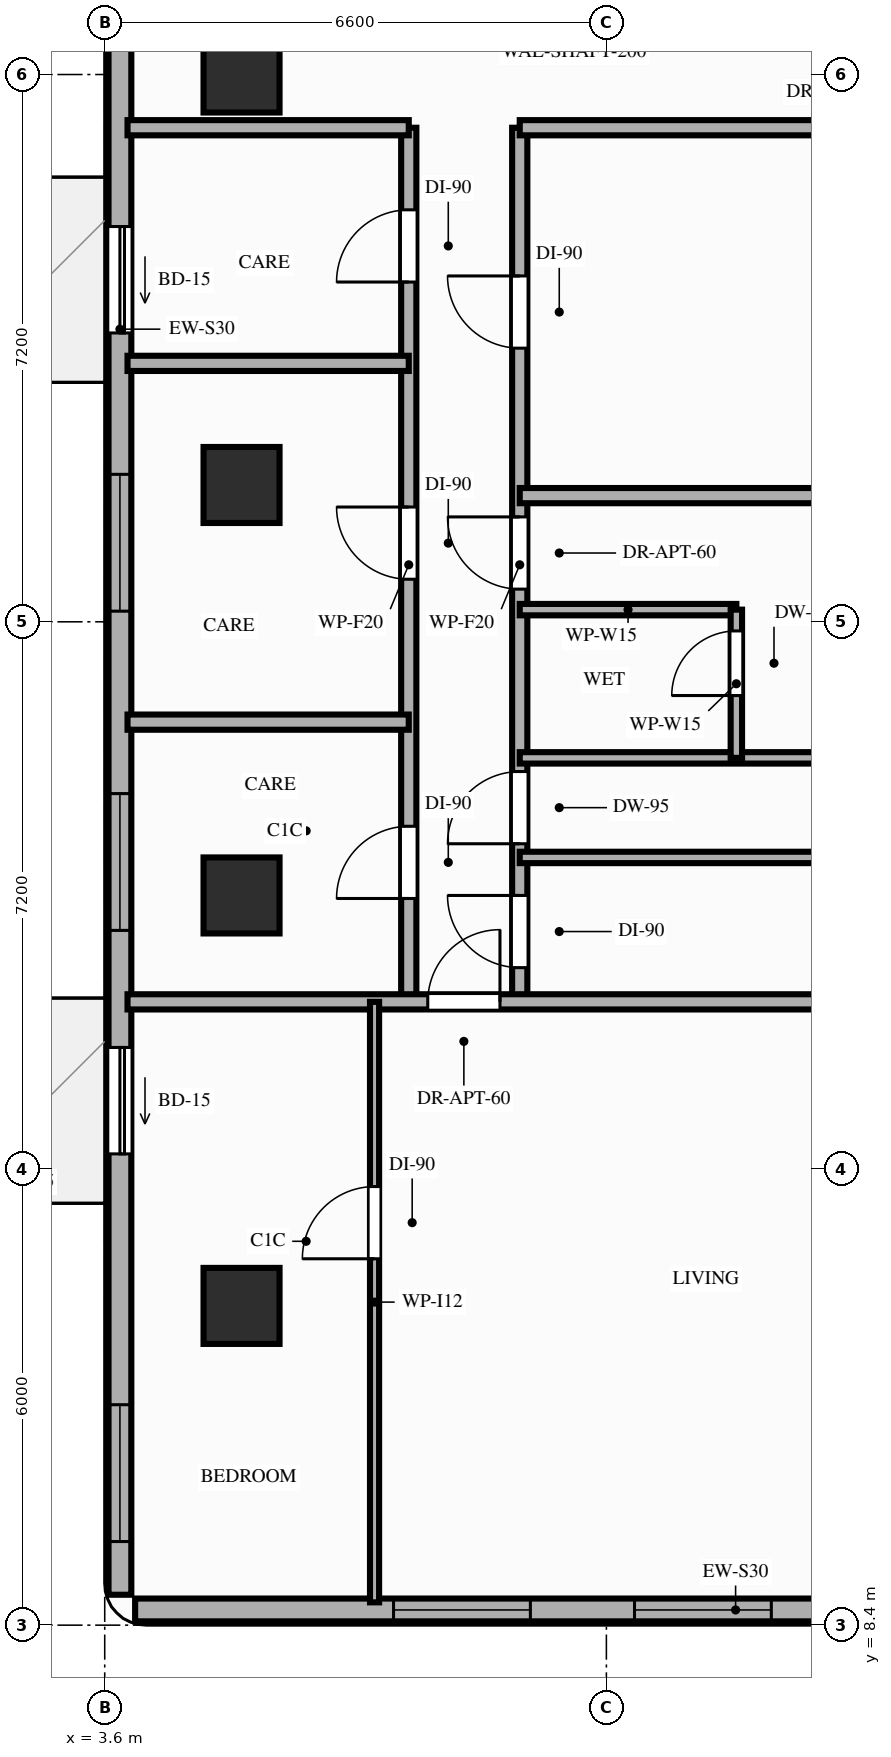
"""IFC4 building model, lengths in metres.
Left out: names, types, materials, properties, quantities, classifications, styles, units other than length and angle.
Written with IfcOpenShell. Run it as: python <this file> out.ifc"""

import sys

from ifc_helpers import new_model, si_unit, direction, frame, frame_2d, origin, origin_2d, place, context, subcontext, project, spatial, rectangle, extrude, element, fill, save


model = new_model("IFC4")
c1 = context("Model", 3, precision=1e-05, world=origin(), true_north=direction((0.0, 1.0)))
c2 = subcontext(c1, "Body", "Model", "MODEL_VIEW")
j1 = project(units=[si_unit("LENGTHUNIT", "METRE"), si_unit("PLANEANGLEUNIT", "RADIAN")], contexts=[c1])
p1 = place(None, origin())
s1 = spatial("IfcSite", under=j1, at=p1, CompositionType="ELEMENT")
p2 = place(p1, origin())
s2 = spatial("IfcBuilding", under=s1, at=p2, CompositionType="ELEMENT")
p3 = place(p2, frame((0.0, 0.0, 152.2)))
s3 = spatial("IfcBuildingStorey", under=s2, at=p3, CompositionType="ELEMENT", Elevation=152.2)
for number, where, z_axis, x_axis in (
    (1, (5.4, 12.6, 0.0), (0.0, 0.0, 1.0), (1.0, 0.0, 0.0)),
    (2, (5.4, 18.0, 0.0), (0.0, 0.0, 1.0), (1.0, 0.0, 0.0)),
    (3, (5.4, 23.4, 0.0), (0.0, 0.0, 1.0), (1.0, 0.0, 0.0)),
    (4, (5.4, 28.8, 0.0), (0.0, 0.0, 1.0), (1.0, 0.0, 0.0)),
):
    element("IfcColumn", number, at=place(p3, frame(where, z_axis=z_axis, x_axis=x_axis)), inside=s3, PredefinedType="COLUMN", context=c2, shape_type="SweptSolid", body=[
        extrude(rectangle(XDim=1.0, YDim=1.0, at=origin_2d()), origin(), (0.0, 0.0, 1.0), 3.8),
    ])
p4 = place(p3, frame((4.0, 8.6, 0.0), z_axis=(0.0, 0.0, 1.0), x_axis=(1.0, 0.0, 0.0)))
e5 = element("IfcWall", 5, at=p4, inside=s3, PredefinedType="STANDARD", context=c2, shape_type="SweptSolid", body=[
    extrude(rectangle(XDim=15.8, YDim=0.3, at=frame_2d((7.9, 0.0))), origin(), (0.0, 0.0, 1.0), 3.56),
])
p5 = place(p4, frame((6.57, 0.0, 0.85)))
e6 = element("IfcOpeningElement", 6, at=p5, cuts=e5, PredefinedType="OPENING", context=c2, shape_type="SweptSolid", body=[
    extrude(rectangle(XDim=1.8, YDim=1.75, at=frame_2d((0.9, 0.875))), frame((0.0, 0.16, 0.0), z_axis=(0.0, -1.0, 0.0), x_axis=(1.0, 0.0, 0.0)), (0.0, 0.0, 1.0), 0.32),
])
p6 = place(p4, frame((3.4, 0.0, 0.85)))
e7 = element("IfcOpeningElement", 7, at=p6, cuts=e5, PredefinedType="OPENING", context=c2, shape_type="SweptSolid", body=[
    extrude(rectangle(XDim=1.8, YDim=1.75, at=frame_2d((0.9, 0.875))), frame((0.0, 0.16, 0.0), z_axis=(0.0, -1.0, 0.0), x_axis=(1.0, 0.0, 0.0)), (0.0, 0.0, 1.0), 0.32),
])
p7 = place(p3, frame((3.8, 42.1, 0.0), z_axis=(0.0, 0.0, 1.0), x_axis=(0.0, -1.0, 0.0)))
e8 = element("IfcWall", 8, at=p7, inside=s3, PredefinedType="STANDARD", context=c2, shape_type="SweptSolid", body=[
    extrude(rectangle(XDim=33.3, YDim=0.3, at=frame_2d((16.65, 0.0))), origin(), (0.0, 0.0, 1.0), 3.56),
])
p8 = place(p7, frame((26.1, 0.0, 0.0)))
e9 = element("IfcOpeningElement", 9, at=p8, cuts=e8, PredefinedType="OPENING", context=c2, shape_type="SweptSolid", body=[
    extrude(rectangle(XDim=1.4, YDim=2.1, at=frame_2d((0.7, 1.05))), frame((0.0, 0.16, 0.0), z_axis=(0.0, -1.0, 0.0), x_axis=(1.0, 0.0, 0.0)), (0.0, 0.0, 1.0), 0.32),
])
p9 = place(p7, frame((15.3, 0.0, 0.0)))
e10 = element("IfcOpeningElement", 10, at=p9, cuts=e8, PredefinedType="OPENING", context=c2, shape_type="SweptSolid", body=[
    extrude(rectangle(XDim=1.4, YDim=2.1, at=frame_2d((0.7, 1.05))), frame((0.0, 0.16, 0.0), z_axis=(0.0, -1.0, 0.0), x_axis=(1.0, 0.0, 0.0)), (0.0, 0.0, 1.0), 0.32),
])
p10 = place(p7, frame((22.76, 0.0, 0.85)))
e11 = element("IfcOpeningElement", 11, at=p10, cuts=e8, PredefinedType="OPENING", context=c2, shape_type="SweptSolid", body=[
    extrude(rectangle(XDim=1.8, YDim=1.75, at=frame_2d((0.9, 0.875))), frame((0.0, 0.16, 0.0), z_axis=(0.0, -1.0, 0.0), x_axis=(1.0, 0.0, 0.0)), (0.0, 0.0, 1.0), 0.32),
])
p11 = place(p7, frame((18.56, 0.0, 0.85)))
e12 = element("IfcOpeningElement", 12, at=p11, cuts=e8, PredefinedType="OPENING", context=c2, shape_type="SweptSolid", body=[
    extrude(rectangle(XDim=1.8, YDim=1.75, at=frame_2d((0.9, 0.875))), frame((0.0, 0.16, 0.0), z_axis=(0.0, -1.0, 0.0), x_axis=(1.0, 0.0, 0.0)), (0.0, 0.0, 1.0), 0.32),
])
p12 = place(p7, frame((30.8, 0.0, 0.85)))
e13 = element("IfcOpeningElement", 13, at=p12, cuts=e8, PredefinedType="OPENING", context=c2, shape_type="SweptSolid", body=[
    extrude(rectangle(XDim=1.8, YDim=1.75, at=frame_2d((0.9, 0.875))), frame((0.0, 0.16, 0.0), z_axis=(0.0, -1.0, 0.0), x_axis=(1.0, 0.0, 0.0)), (0.0, 0.0, 1.0), 0.32),
])
p13 = place(p7, frame((9.9, 0.0, 0.85)))
e14 = element("IfcOpeningElement", 14, at=p13, cuts=e8, PredefinedType="OPENING", context=c2, shape_type="SweptSolid", body=[
    extrude(rectangle(XDim=1.8, YDim=1.75, at=frame_2d((0.9, 0.875))), frame((0.0, 0.16, 0.0), z_axis=(0.0, -1.0, 0.0), x_axis=(1.0, 0.0, 0.0)), (0.0, 0.0, 1.0), 0.32),
])
p14 = place(p7, frame((3.8, 0.0, 0.85)))
e15 = element("IfcOpeningElement", 15, at=p14, cuts=e8, PredefinedType="OPENING", context=c2, shape_type="SweptSolid", body=[
    extrude(rectangle(XDim=1.8, YDim=1.75, at=frame_2d((0.9, 0.875))), frame((0.0, 0.16, 0.0), z_axis=(0.0, -1.0, 0.0), x_axis=(1.0, 0.0, 0.0)), (0.0, 0.0, 1.0), 0.32),
])
p15 = place(p3, frame((7.6, 16.6, 0.0), z_axis=(0.0, 0.0, 1.0), x_axis=(0.0, 1.0, 0.0)))
e16 = element("IfcWall", 16, at=p15, inside=s3, PredefinedType="PARTITIONING", context=c2, shape_type="SweptSolid", body=[
    extrude(rectangle(XDim=11.5, YDim=0.2, at=frame_2d((5.75, 0.0))), origin(), (0.0, 0.0, 1.0), 2.99),
])
p16 = place(p15, frame((1.36, 0.0, 0.0)))
e17 = element("IfcOpeningElement", 17, at=p16, cuts=e16, PredefinedType="OPENING", context=c2, shape_type="SweptSolid", body=[
    extrude(rectangle(XDim=0.95, YDim=2.15, at=frame_2d((0.475, 1.075))), frame((0.0, 0.11, 0.0), z_axis=(0.0, -1.0, 0.0), x_axis=(1.0, 0.0, 0.0)), (0.0, 0.0, 1.0), 0.22),
])
p17 = place(p15, frame((5.56, 0.0, 0.0)))
e18 = element("IfcOpeningElement", 18, at=p17, cuts=e16, PredefinedType="OPENING", context=c2, shape_type="SweptSolid", body=[
    extrude(rectangle(XDim=0.95, YDim=2.15, at=frame_2d((0.475, 1.075))), frame((0.0, 0.11, 0.0), z_axis=(0.0, -1.0, 0.0), x_axis=(1.0, 0.0, 0.0)), (0.0, 0.0, 1.0), 0.22),
])
p18 = place(p15, frame((9.47, 0.0, 0.0)))
e19 = element("IfcOpeningElement", 19, at=p18, cuts=e16, PredefinedType="OPENING", context=c2, shape_type="SweptSolid", body=[
    extrude(rectangle(XDim=0.95, YDim=2.15, at=frame_2d((0.475, 1.075))), frame((0.0, 0.11, 0.0), z_axis=(0.0, -1.0, 0.0), x_axis=(1.0, 0.0, 0.0)), (0.0, 0.0, 1.0), 0.22),
])
p19 = place(p3, frame((9.06, 16.6, 0.0), z_axis=(0.0, 0.0, 1.0), x_axis=(0.0, 1.0, 0.0)))
e20 = element("IfcWall", 20, at=p19, inside=s3, PredefinedType="PARTITIONING", context=c2, shape_type="SweptSolid", body=[
    extrude(rectangle(XDim=11.5, YDim=0.2, at=frame_2d((5.75, 0.0))), origin(), (0.0, 0.0, 1.0), 2.99),
])
p20 = place(p19, frame((0.45, 0.0, 0.0)))
e21 = element("IfcOpeningElement", 21, at=p20, cuts=e20, PredefinedType="OPENING", context=c2, shape_type="SweptSolid", body=[
    extrude(rectangle(XDim=0.95, YDim=2.15, at=frame_2d((0.475, 1.075))), frame((0.0, 0.11, 0.0), z_axis=(0.0, -1.0, 0.0), x_axis=(1.0, 0.0, 0.0)), (0.0, 0.0, 1.0), 0.22),
])
p21 = place(p19, frame((2.08, 0.0, 0.0)))
e22 = element("IfcOpeningElement", 22, at=p21, cuts=e20, PredefinedType="OPENING", context=c2, shape_type="SweptSolid", body=[
    extrude(rectangle(XDim=0.95, YDim=2.1, at=frame_2d((0.475, 1.05))), frame((0.0, 0.11, 0.0), z_axis=(0.0, -1.0, 0.0), x_axis=(1.0, 0.0, 0.0)), (0.0, 0.0, 1.0), 0.22),
])
p22 = place(p19, frame((8.6, 0.0, 0.0)))
e23 = element("IfcOpeningElement", 23, at=p22, cuts=e20, PredefinedType="OPENING", context=c2, shape_type="SweptSolid", body=[
    extrude(rectangle(XDim=0.95, YDim=2.15, at=frame_2d((0.475, 1.075))), frame((0.0, 0.11, 0.0), z_axis=(0.0, -1.0, 0.0), x_axis=(1.0, 0.0, 0.0)), (0.0, 0.0, 1.0), 0.22),
])
p23 = place(p19, frame((5.43, 0.0, 0.0)))
e24 = element("IfcOpeningElement", 24, at=p23, cuts=e20, PredefinedType="OPENING", context=c2, shape_type="SweptSolid", body=[
    extrude(rectangle(XDim=0.95, YDim=2.15, at=frame_2d((0.475, 1.075))), frame((0.0, 0.11, 0.0), z_axis=(0.0, -1.0, 0.0), x_axis=(1.0, 0.0, 0.0)), (0.0, 0.0, 1.0), 0.22),
])
p24 = place(p3, frame((3.9, 16.6, 0.0), z_axis=(0.0, 0.0, 1.0), x_axis=(1.0, 0.0, 0.0)))
e25 = element("IfcWall", 25, at=p24, inside=s3, PredefinedType="PARTITIONING", context=c2, shape_type="SweptSolid", body=[
    extrude(rectangle(XDim=16.0, YDim=0.2, at=frame_2d((8.0, 0.0))), origin(), (0.0, 0.0, 1.0), 2.99),
])
p25 = place(p24, frame((3.95, 0.0, 0.0)))
e26 = element("IfcOpeningElement", 26, at=p25, cuts=e25, PredefinedType="OPENING", context=c2, shape_type="SweptSolid", body=[
    extrude(rectangle(XDim=0.95, YDim=2.15, at=frame_2d((0.475, 1.075))), frame((0.0, 0.11, 0.0), z_axis=(0.0, -1.0, 0.0), x_axis=(1.0, 0.0, 0.0)), (0.0, 0.0, 1.0), 0.22),
])
p26 = place(p3, frame((3.9, 28.1, 0.0), z_axis=(0.0, 0.0, 1.0), x_axis=(1.0, 0.0, 0.0)))
e27 = element("IfcWall", 27, at=p26, inside=s3, PredefinedType="PARTITIONING", context=c2, shape_type="SweptSolid", body=[
    extrude(rectangle(XDim=3.7, YDim=0.2, at=frame_2d((1.85, 0.0))), origin(), (0.0, 0.0, 1.0), 2.99),
])
p27 = place(p3, frame((9.06, 28.1, 0.0), z_axis=(0.0, 0.0, 1.0), x_axis=(1.0, 0.0, 0.0)))
e28 = element("IfcWall", 28, at=p27, inside=s3, PredefinedType="PARTITIONING", context=c2, shape_type="SweptSolid", body=[
    extrude(rectangle(XDim=10.84, YDim=0.2, at=frame_2d((5.42, 0.0))), origin(), (0.0, 0.0, 1.0), 2.99),
])
for number, where, z_axis, x_axis in (
    (29, (3.9, 20.28, 0.0), (0.0, 0.0, 1.0), (1.0, 0.0, 0.0)),
    (30, (3.9, 25.0, 0.0), (0.0, 0.0, 1.0), (1.0, 0.0, 0.0)),
):
    element("IfcWall", number, at=place(p3, frame(where, z_axis=z_axis, x_axis=x_axis)), inside=s3, PredefinedType="PARTITIONING", context=c2, shape_type="SweptSolid", body=[
        extrude(rectangle(XDim=3.7, YDim=0.2, at=frame_2d((1.85, 0.0))), origin(), (0.0, 0.0, 1.0), 2.99),
    ])
p28 = place(p3, frame((7.15, 8.7, 0.0), z_axis=(0.0, 0.0, 1.0), x_axis=(0.0, 1.0, 0.0)))
e31 = element("IfcWall", 31, at=p28, inside=s3, PredefinedType="PARTITIONING", context=c2, shape_type="SweptSolid", body=[
    extrude(rectangle(XDim=7.9, YDim=0.12, at=frame_2d((3.95, 0.0))), origin(), (0.0, 0.0, 1.0), 2.99),
])
p29 = place(p28, frame((4.52, 0.0, 0.0)))
e32 = element("IfcOpeningElement", 32, at=p29, cuts=e31, PredefinedType="OPENING", context=c2, shape_type="SweptSolid", body=[
    extrude(rectangle(XDim=0.95, YDim=2.15, at=frame_2d((0.475, 1.075))), frame((0.0, 0.07, 0.0), z_axis=(0.0, -1.0, 0.0), x_axis=(1.0, 0.0, 0.0)), (0.0, 0.0, 1.0), 0.14),
])
for number, where, z_axis, x_axis in (
    (33, (9.06, 18.5, 0.0), (0.0, 0.0, 1.0), (1.0, 0.0, 0.0)),
    (34, (9.06, 19.81, 0.0), (0.0, 0.0, 1.0), (1.0, 0.0, 0.0)),
):
    element("IfcWall", number, at=place(p3, frame(where, z_axis=z_axis, x_axis=x_axis)), inside=s3, PredefinedType="PARTITIONING", context=c2, shape_type="SweptSolid", body=[
        extrude(rectangle(XDim=10.84, YDim=0.15, at=frame_2d((5.42, 0.0))), origin(), (0.0, 0.0, 1.0), 2.99),
    ])
p30 = place(p3, frame((9.06, 23.26, 0.0), z_axis=(0.0, 0.0, 1.0), x_axis=(1.0, 0.0, 0.0)))
e35 = element("IfcWall", 35, at=p30, inside=s3, PredefinedType="PARTITIONING", context=c2, shape_type="SweptSolid", body=[
    extrude(rectangle(XDim=10.84, YDim=0.2, at=frame_2d((5.42, 0.0))), origin(), (0.0, 0.0, 1.0), 2.99),
])
p31 = place(p3, frame((9.06, 21.76, 0.0), z_axis=(0.0, 0.0, 1.0), x_axis=(1.0, 0.0, 0.0)))
e36 = element("IfcWall", 36, at=p31, inside=s3, PredefinedType="PARTITIONING", context=c2, shape_type="SweptSolid", body=[
    extrude(rectangle(XDim=2.85, YDim=0.15, at=frame_2d((1.425, 0.0))), origin(), (0.0, 0.0, 1.0), 3.15),
])
p32 = place(p3, frame((11.91, 19.81, 0.0), z_axis=(0.0, 0.0, 1.0), x_axis=(0.0, 1.0, 0.0)))
e37 = element("IfcWall", 37, at=p32, inside=s3, PredefinedType="PARTITIONING", context=c2, shape_type="SweptSolid", body=[
    extrude(rectangle(XDim=1.95, YDim=0.15, at=frame_2d((0.975, 0.0))), origin(), (0.0, 0.0, 1.0), 3.15),
])
p33 = place(p32, frame((0.82, 0.0, 0.0)))
e38 = element("IfcOpeningElement", 38, at=p33, cuts=e37, PredefinedType="OPENING", context=c2, shape_type="SweptSolid", body=[
    extrude(rectangle(XDim=0.85, YDim=2.1, at=frame_2d((0.425, 1.05))), frame((0.0, 0.085, 0.0), z_axis=(0.0, -1.0, 0.0), x_axis=(1.0, 0.0, 0.0)), (0.0, 0.0, 1.0), 0.17),
])
p34 = place(p8, origin())
e39 = element("IfcDoor", 39, at=p34, inside=s3, OperationType="SLIDING_TO_RIGHT", PredefinedType="DOOR", context=c2, shape_type="SweptSolid", body=[
    extrude(rectangle(XDim=1.4, YDim=2.1, at=frame_2d((0.7, 1.05))), frame((0.0, 0.025, 0.0), z_axis=(0.0, -1.0, 0.0), x_axis=(1.0, 0.0, 0.0)), (0.0, 0.0, 1.0), 0.05),
])
fill(e9, e39)
p35 = place(p9, origin())
e40 = element("IfcDoor", 40, at=p35, inside=s3, OperationType="SLIDING_TO_RIGHT", PredefinedType="DOOR", context=c2, shape_type="SweptSolid", body=[
    extrude(rectangle(XDim=1.4, YDim=2.1, at=frame_2d((0.7, 1.05))), frame((0.0, 0.025, 0.0), z_axis=(0.0, -1.0, 0.0), x_axis=(1.0, 0.0, 0.0)), (0.0, 0.0, 1.0), 0.05),
])
fill(e10, e40)
p36 = place(p10, origin())
e41 = element("IfcWindow", 41, at=p36, inside=s3, PartitioningType="SINGLE_PANEL", PredefinedType="WINDOW", context=c2, shape_type="SweptSolid", body=[
    extrude(rectangle(XDim=1.8, YDim=1.75, at=frame_2d((0.9, 0.875))), frame((0.0, 0.03, 0.0), z_axis=(0.0, -1.0, 0.0), x_axis=(1.0, 0.0, 0.0)), (0.0, 0.0, 1.0), 0.06),
])
fill(e11, e41)
p37 = place(p11, origin())
e42 = element("IfcWindow", 42, at=p37, inside=s3, PartitioningType="SINGLE_PANEL", PredefinedType="WINDOW", context=c2, shape_type="SweptSolid", body=[
    extrude(rectangle(XDim=1.8, YDim=1.75, at=frame_2d((0.9, 0.875))), frame((0.0, 0.03, 0.0), z_axis=(0.0, -1.0, 0.0), x_axis=(1.0, 0.0, 0.0)), (0.0, 0.0, 1.0), 0.06),
])
fill(e12, e42)
p38 = place(p5, origin())
e43 = element("IfcWindow", 43, at=p38, inside=s3, PartitioningType="SINGLE_PANEL", PredefinedType="WINDOW", context=c2, shape_type="SweptSolid", body=[
    extrude(rectangle(XDim=1.8, YDim=1.75, at=frame_2d((0.9, 0.875))), frame((0.0, 0.03, 0.0), z_axis=(0.0, -1.0, 0.0), x_axis=(1.0, 0.0, 0.0)), (0.0, 0.0, 1.0), 0.06),
])
fill(e6, e43)
p39 = place(p12, origin())
e44 = element("IfcWindow", 44, at=p39, inside=s3, PartitioningType="SINGLE_PANEL", PredefinedType="WINDOW", context=c2, shape_type="SweptSolid", body=[
    extrude(rectangle(XDim=1.8, YDim=1.75, at=frame_2d((0.9, 0.875))), frame((0.0, 0.03, 0.0), z_axis=(0.0, -1.0, 0.0), x_axis=(1.0, 0.0, 0.0)), (0.0, 0.0, 1.0), 0.06),
])
fill(e13, e44)
p40 = place(p6, origin())
e45 = element("IfcWindow", 45, at=p40, inside=s3, PartitioningType="SINGLE_PANEL", PredefinedType="WINDOW", context=c2, shape_type="SweptSolid", body=[
    extrude(rectangle(XDim=1.8, YDim=1.75, at=frame_2d((0.9, 0.875))), frame((0.0, 0.03, 0.0), z_axis=(0.0, -1.0, 0.0), x_axis=(1.0, 0.0, 0.0)), (0.0, 0.0, 1.0), 0.06),
])
fill(e7, e45)
p41 = place(p16, origin())
e46 = element("IfcDoor", 46, at=p41, inside=s3, OperationType="SINGLE_SWING_LEFT", PredefinedType="DOOR", context=c2, shape_type="SweptSolid", body=[
    extrude(rectangle(XDim=0.95, YDim=2.15, at=frame_2d((0.475, 1.075))), frame((0.0, 0.025, 0.0), z_axis=(0.0, -1.0, 0.0), x_axis=(1.0, 0.0, 0.0)), (0.0, 0.0, 1.0), 0.05),
])
fill(e17, e46)
p42 = place(p17, origin())
e47 = element("IfcDoor", 47, at=p42, inside=s3, OperationType="SINGLE_SWING_RIGHT", PredefinedType="DOOR", context=c2, shape_type="SweptSolid", body=[
    extrude(rectangle(XDim=0.95, YDim=2.15, at=frame_2d((0.475, 1.075))), frame((0.0, 0.025, 0.0), z_axis=(0.0, -1.0, 0.0), x_axis=(1.0, 0.0, 0.0)), (0.0, 0.0, 1.0), 0.05),
])
fill(e18, e47)
p43 = place(p18, origin())
e48 = element("IfcDoor", 48, at=p43, inside=s3, OperationType="SINGLE_SWING_LEFT", PredefinedType="DOOR", context=c2, shape_type="SweptSolid", body=[
    extrude(rectangle(XDim=0.95, YDim=2.15, at=frame_2d((0.475, 1.075))), frame((0.0, 0.025, 0.0), z_axis=(0.0, -1.0, 0.0), x_axis=(1.0, 0.0, 0.0)), (0.0, 0.0, 1.0), 0.05),
])
fill(e19, e48)
p44 = place(p25, origin())
e49 = element("IfcDoor", 49, at=p44, inside=s3, OperationType="SINGLE_SWING_RIGHT", PredefinedType="DOOR", context=c2, shape_type="SweptSolid", body=[
    extrude(rectangle(XDim=0.95, YDim=2.15, at=frame_2d((0.475, 1.075))), frame((0.0, 0.025, 0.0), z_axis=(0.0, -1.0, 0.0), x_axis=(1.0, 0.0, 0.0)), (0.0, 0.0, 1.0), 0.05),
])
fill(e26, e49)
p45 = place(p29, origin())
e50 = element("IfcDoor", 50, at=p45, inside=s3, OperationType="SINGLE_SWING_LEFT", PredefinedType="DOOR", context=c2, shape_type="SweptSolid", body=[
    extrude(rectangle(XDim=0.95, YDim=2.15, at=frame_2d((0.475, 1.075))), frame((0.0, 0.025, 0.0), z_axis=(0.0, -1.0, 0.0), x_axis=(1.0, 0.0, 0.0)), (0.0, 0.0, 1.0), 0.05),
])
fill(e32, e50)
p46 = place(p20, origin())
e51 = element("IfcDoor", 51, at=p46, inside=s3, OperationType="SINGLE_SWING_RIGHT", PredefinedType="DOOR", context=c2, shape_type="SweptSolid", body=[
    extrude(rectangle(XDim=0.95, YDim=2.15, at=frame_2d((0.475, 1.075))), frame((0.0, 0.025, 0.0), z_axis=(0.0, -1.0, 0.0), x_axis=(1.0, 0.0, 0.0)), (0.0, 0.0, 1.0), 0.05),
])
fill(e21, e51)
p47 = place(p21, origin())
e52 = element("IfcDoor", 52, at=p47, inside=s3, OperationType="SINGLE_SWING_LEFT", PredefinedType="DOOR", context=c2, shape_type="SweptSolid", body=[
    extrude(rectangle(XDim=0.95, YDim=2.1, at=frame_2d((0.475, 1.05))), frame((0.0, 0.025, 0.0), z_axis=(0.0, -1.0, 0.0), x_axis=(1.0, 0.0, 0.0)), (0.0, 0.0, 1.0), 0.05),
])
fill(e22, e52)
p48 = place(p22, origin())
e53 = element("IfcDoor", 53, at=p48, inside=s3, OperationType="SINGLE_SWING_RIGHT", PredefinedType="DOOR", context=c2, shape_type="SweptSolid", body=[
    extrude(rectangle(XDim=0.95, YDim=2.15, at=frame_2d((0.475, 1.075))), frame((0.0, 0.025, 0.0), z_axis=(0.0, -1.0, 0.0), x_axis=(1.0, 0.0, 0.0)), (0.0, 0.0, 1.0), 0.05),
])
fill(e23, e53)
p49 = place(p33, origin())
e54 = element("IfcDoor", 54, at=p49, inside=s3, OperationType="SINGLE_SWING_LEFT", PredefinedType="DOOR", context=c2, shape_type="SweptSolid", body=[
    extrude(rectangle(XDim=0.85, YDim=2.1, at=frame_2d((0.425, 1.05))), frame((0.0, 0.025, 0.0), z_axis=(0.0, -1.0, 0.0), x_axis=(1.0, 0.0, 0.0)), (0.0, 0.0, 1.0), 0.05),
])
fill(e38, e54)
p50 = place(p23, origin())
e55 = element("IfcDoor", 55, at=p50, inside=s3, OperationType="SINGLE_SWING_RIGHT", PredefinedType="DOOR", context=c2, shape_type="SweptSolid", body=[
    extrude(rectangle(XDim=0.95, YDim=2.15, at=frame_2d((0.475, 1.075))), frame((0.0, 0.025, 0.0), z_axis=(0.0, -1.0, 0.0), x_axis=(1.0, 0.0, 0.0)), (0.0, 0.0, 1.0), 0.05),
])
fill(e24, e55)
save(model, sys.argv[1])
